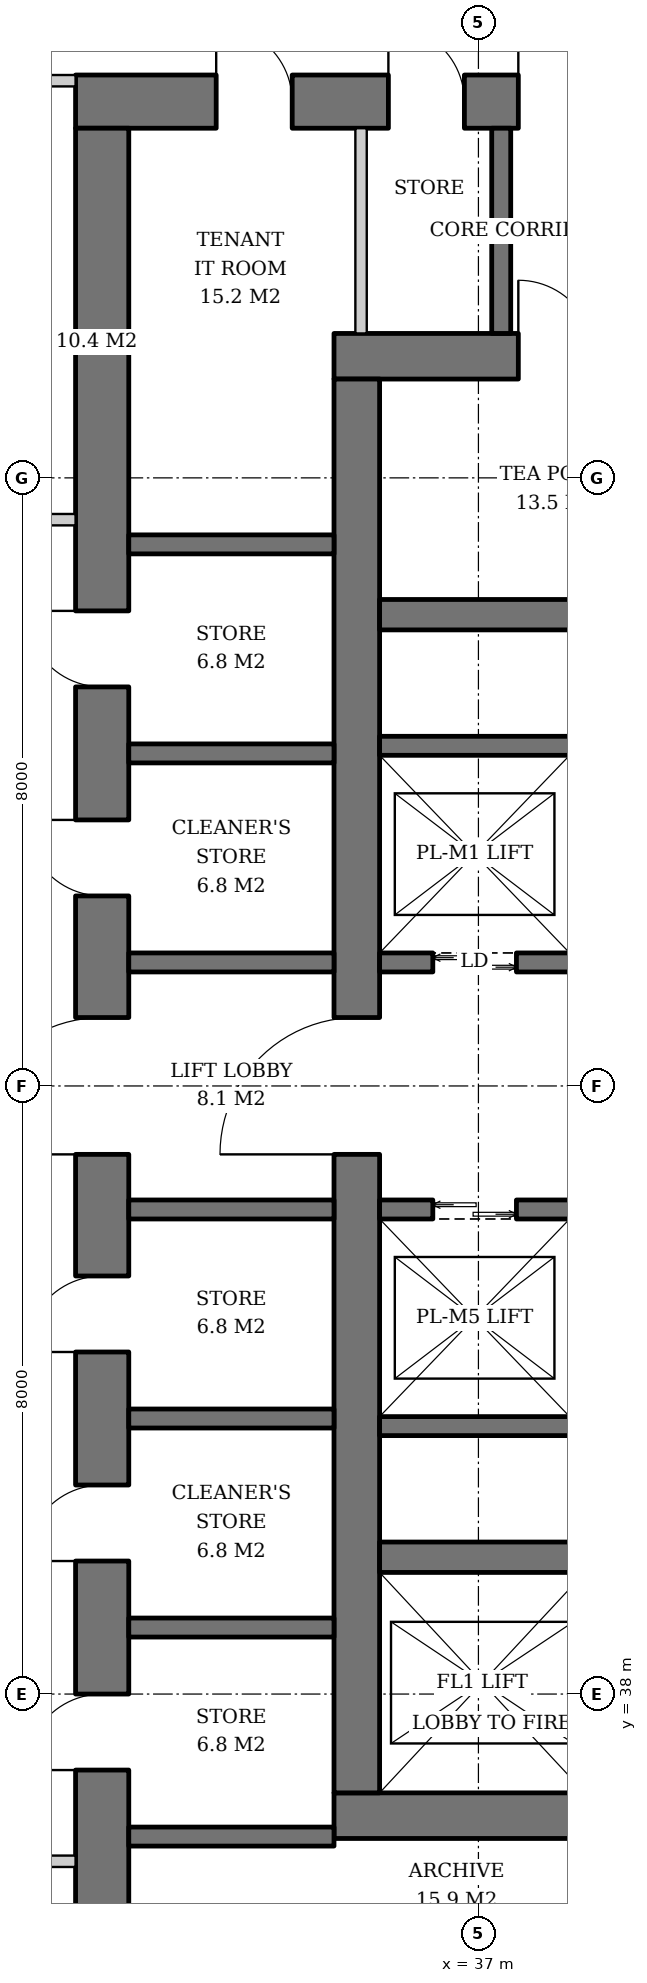
"""IFC4 building model, lengths in metres.
Left out: names, types, materials, properties, quantities, classifications, styles, units other than length and angle.
Written with IfcOpenShell. Run it as: python <this file> out.ifc"""

import sys

from ifc_helpers import new_model, si_unit, direction, frame, frame_2d, origin, place, context, subcontext, project, spatial, rectangle, extrude, element, fill, save


model = new_model("IFC4")
c1 = context("Model", 3, precision=1e-05, world=origin(), true_north=direction((0.0, 1.0)))
c2 = subcontext(c1, "Body", "Model", "MODEL_VIEW")
j1 = project(units=[si_unit("LENGTHUNIT", "METRE"), si_unit("PLANEANGLEUNIT", "RADIAN")], contexts=[c1])
p1 = place(None, origin())
s1 = spatial("IfcSite", under=j1, at=p1, CompositionType="ELEMENT")
p2 = place(p1, origin())
s2 = spatial("IfcBuilding", under=s1, at=p2, CompositionType="ELEMENT")
p3 = place(p2, frame((0.0, 0.0, 108.4)))
s3 = spatial("IfcBuildingStorey", under=s2, at=p3, CompositionType="ELEMENT", Elevation=108.4)
p4 = place(p3, frame((35.1, 36.4, 0.0), z_axis=(0.0, 0.0, 1.0), x_axis=(1.0, 0.0, 0.0)))
e1 = element("IfcWall", 1, at=p4, inside=s3, PredefinedType="SHEAR", context=c2, shape_type="SweptSolid", body=[
    extrude(rectangle(XDim=19.8, YDim=0.6, at=frame_2d((9.9, 0.0))), origin(), (0.0, 0.0, 1.0), 3.8),
])
p5 = place(p4, frame((3.9, 0.0, 0.0)))
e2 = element("IfcOpeningElement", 2, at=p5, cuts=e1, PredefinedType="OPENING", context=c2, shape_type="SweptSolid", body=[
    extrude(rectangle(XDim=1.0, YDim=2.1, at=frame_2d((0.5, 1.05))), frame((0.0, 0.31, 0.0), z_axis=(0.0, -1.0, 0.0), x_axis=(1.0, 0.0, 0.0)), (0.0, 0.0, 1.0), 0.62),
])
p6 = place(p4, frame((15.35, 0.0, 0.0)))
e3 = element("IfcOpeningElement", 3, at=p6, cuts=e1, PredefinedType="OPENING", context=c2, shape_type="SweptSolid", body=[
    extrude(rectangle(XDim=1.0, YDim=2.1, at=frame_2d((0.5, 1.05))), frame((0.0, 0.31, 0.0), z_axis=(0.0, -1.0, 0.0), x_axis=(1.0, 0.0, 0.0)), (0.0, 0.0, 1.0), 0.62),
])
p7 = place(p3, frame((35.1, 55.6, 0.0), z_axis=(0.0, 0.0, 1.0), x_axis=(1.0, 0.0, 0.0)))
e4 = element("IfcWall", 4, at=p7, inside=s3, PredefinedType="SHEAR", context=c2, shape_type="SweptSolid", body=[
    extrude(rectangle(XDim=19.8, YDim=0.6, at=frame_2d((9.9, 0.0))), origin(), (0.0, 0.0, 1.0), 3.8),
])
p8 = place(p7, frame((14.54, 0.0, 0.0)))
e5 = element("IfcOpeningElement", 5, at=p8, cuts=e4, PredefinedType="OPENING", context=c2, shape_type="SweptSolid", body=[
    extrude(rectangle(XDim=1.0, YDim=2.1, at=frame_2d((0.5, 1.05))), frame((0.0, 0.31, 0.0), z_axis=(0.0, -1.0, 0.0), x_axis=(1.0, 0.0, 0.0)), (0.0, 0.0, 1.0), 0.62),
])
p9 = place(p7, frame((2.425, 0.0, 0.0)))
e6 = element("IfcOpeningElement", 6, at=p9, cuts=e4, PredefinedType="OPENING", context=c2, shape_type="SweptSolid", body=[
    extrude(rectangle(XDim=1.0, YDim=2.1, at=frame_2d((0.5, 1.05))), frame((0.0, 0.31, 0.0), z_axis=(0.0, -1.0, 0.0), x_axis=(1.0, 0.0, 0.0)), (0.0, 0.0, 1.0), 0.62),
])
p10 = place(p3, frame((35.4, 36.7, 0.0), z_axis=(0.0, 0.0, 1.0), x_axis=(0.0, 1.0, 0.0)))
e7 = element("IfcWall", 7, at=p10, inside=s3, PredefinedType="SHEAR", context=c2, shape_type="SweptSolid", body=[
    extrude(rectangle(XDim=18.6, YDim=0.6, at=frame_2d((9.3, 0.0))), origin(), (0.0, 0.0, 1.0), 3.8),
])
p11 = place(p10, frame((8.4, 0.0, 0.0)))
e8 = element("IfcOpeningElement", 8, at=p11, cuts=e7, PredefinedType="OPENING", context=c2, shape_type="SweptSolid", body=[
    extrude(rectangle(XDim=1.8, YDim=2.4, at=frame_2d((0.9, 1.2))), frame((0.0, 0.31, 0.0), z_axis=(0.0, -1.0, 0.0), x_axis=(1.0, 0.0, 0.0)), (0.0, 0.0, 1.0), 0.62),
])
p12 = place(p3, frame((31.7, 58.95, 0.0), z_axis=(0.0, 0.0, 1.0), x_axis=(1.0, 0.0, 0.0)))
e9 = element("IfcWall", 9, at=p12, inside=s3, PredefinedType="SHEAR", context=c2, shape_type="SweptSolid", body=[
    extrude(rectangle(XDim=26.6, YDim=0.7, at=frame_2d((13.3, 0.0))), origin(), (0.0, 0.0, 1.0), 3.8),
])
p13 = place(p12, frame((17.94, 0.0, 0.0)))
e10 = element("IfcOpeningElement", 10, at=p13, cuts=e9, PredefinedType="OPENING", context=c2, shape_type="SweptSolid", body=[
    extrude(rectangle(XDim=1.0, YDim=2.1, at=frame_2d((0.5, 1.05))), frame((0.0, 0.36, 0.0), z_axis=(0.0, -1.0, 0.0), x_axis=(1.0, 0.0, 0.0)), (0.0, 0.0, 1.0), 0.72),
])
p14 = place(p12, frame((5.825, 0.0, 0.0)))
e11 = element("IfcOpeningElement", 11, at=p14, cuts=e9, PredefinedType="OPENING", context=c2, shape_type="SweptSolid", body=[
    extrude(rectangle(XDim=1.0, YDim=2.1, at=frame_2d((0.5, 1.05))), frame((0.0, 0.36, 0.0), z_axis=(0.0, -1.0, 0.0), x_axis=(1.0, 0.0, 0.0)), (0.0, 0.0, 1.0), 0.72),
])
p15 = place(p12, frame((1.85, 0.0, 0.0)))
e12 = element("IfcOpeningElement", 12, at=p15, cuts=e9, PredefinedType="OPENING", context=c2, shape_type="SweptSolid", body=[
    extrude(rectangle(XDim=1.0, YDim=2.1, at=frame_2d((0.5, 1.05))), frame((0.0, 0.36, 0.0), z_axis=(0.0, -1.0, 0.0), x_axis=(1.0, 0.0, 0.0)), (0.0, 0.0, 1.0), 0.72),
])
p16 = place(p12, frame((4.115, 0.0, 0.0)))
e13 = element("IfcOpeningElement", 13, at=p16, cuts=e9, PredefinedType="OPENING", context=c2, shape_type="SweptSolid", body=[
    extrude(rectangle(XDim=1.0, YDim=2.1, at=frame_2d((0.5, 1.05))), frame((0.0, 0.36, 0.0), z_axis=(0.0, -1.0, 0.0), x_axis=(1.0, 0.0, 0.0)), (0.0, 0.0, 1.0), 0.72),
])
p17 = place(p12, frame((11.577, 0.0, 0.0)))
e14 = element("IfcOpeningElement", 14, at=p17, cuts=e9, PredefinedType="OPENING", context=c2, shape_type="SweptSolid", body=[
    extrude(rectangle(XDim=1.0, YDim=2.1, at=frame_2d((0.5, 1.05))), frame((0.0, 0.36, 0.0), z_axis=(0.0, -1.0, 0.0), x_axis=(1.0, 0.0, 0.0)), (0.0, 0.0, 1.0), 0.72),
])
p18 = place(p12, frame((20.9, 0.0, 0.0)))
e15 = element("IfcOpeningElement", 15, at=p18, cuts=e9, PredefinedType="OPENING", context=c2, shape_type="SweptSolid", body=[
    extrude(rectangle(XDim=1.0, YDim=2.1, at=frame_2d((0.5, 1.05))), frame((0.0, 0.36, 0.0), z_axis=(0.0, -1.0, 0.0), x_axis=(1.0, 0.0, 0.0)), (0.0, 0.0, 1.0), 0.72),
])
p19 = place(p12, frame((23.75, 0.0, 0.0)))
e16 = element("IfcOpeningElement", 16, at=p19, cuts=e9, PredefinedType="OPENING", context=c2, shape_type="SweptSolid", body=[
    extrude(rectangle(XDim=1.0, YDim=2.1, at=frame_2d((0.5, 1.05))), frame((0.0, 0.36, 0.0), z_axis=(0.0, -1.0, 0.0), x_axis=(1.0, 0.0, 0.0)), (0.0, 0.0, 1.0), 0.72),
])
p20 = place(p3, frame((32.05, 33.4, 0.0), z_axis=(0.0, 0.0, 1.0), x_axis=(0.0, 1.0, 0.0)))
e17 = element("IfcWall", 17, at=p20, inside=s3, PredefinedType="SHEAR", context=c2, shape_type="SweptSolid", body=[
    extrude(rectangle(XDim=25.2, YDim=0.7, at=frame_2d((12.6, 0.0))), origin(), (0.0, 0.0, 1.0), 3.8),
])
p21 = place(p20, frame((11.7, 0.0, 0.0)))
e18 = element("IfcOpeningElement", 18, at=p21, cuts=e17, PredefinedType="OPENING", context=c2, shape_type="SweptSolid", body=[
    extrude(rectangle(XDim=1.8, YDim=2.4, at=frame_2d((0.9, 1.2))), frame((0.0, 0.36, 0.0), z_axis=(0.0, -1.0, 0.0), x_axis=(1.0, 0.0, 0.0)), (0.0, 0.0, 1.0), 0.72),
])
p22 = place(p20, frame((3.6, 0.0, 0.0)))
e19 = element("IfcOpeningElement", 19, at=p22, cuts=e17, PredefinedType="OPENING", context=c2, shape_type="SweptSolid", body=[
    extrude(rectangle(XDim=1.0, YDim=2.1, at=frame_2d((0.5, 1.05))), frame((0.0, 0.36, 0.0), z_axis=(0.0, -1.0, 0.0), x_axis=(1.0, 0.0, 0.0)), (0.0, 0.0, 1.0), 0.72),
])
p23 = place(p20, frame((6.35, 0.0, 0.0)))
e20 = element("IfcOpeningElement", 20, at=p23, cuts=e17, PredefinedType="OPENING", context=c2, shape_type="SweptSolid", body=[
    extrude(rectangle(XDim=1.0, YDim=2.1, at=frame_2d((0.5, 1.05))), frame((0.0, 0.36, 0.0), z_axis=(0.0, -1.0, 0.0), x_axis=(1.0, 0.0, 0.0)), (0.0, 0.0, 1.0), 0.72),
])
p24 = place(p20, frame((9.1, 0.0, 0.0)))
e21 = element("IfcOpeningElement", 21, at=p24, cuts=e17, PredefinedType="OPENING", context=c2, shape_type="SweptSolid", body=[
    extrude(rectangle(XDim=1.0, YDim=2.1, at=frame_2d((0.5, 1.05))), frame((0.0, 0.36, 0.0), z_axis=(0.0, -1.0, 0.0), x_axis=(1.0, 0.0, 0.0)), (0.0, 0.0, 1.0), 0.72),
])
p25 = place(p20, frame((15.1, 0.0, 0.0)))
e22 = element("IfcOpeningElement", 22, at=p25, cuts=e17, PredefinedType="OPENING", context=c2, shape_type="SweptSolid", body=[
    extrude(rectangle(XDim=1.0, YDim=2.1, at=frame_2d((0.5, 1.05))), frame((0.0, 0.36, 0.0), z_axis=(0.0, -1.0, 0.0), x_axis=(1.0, 0.0, 0.0)), (0.0, 0.0, 1.0), 0.72),
])
p26 = place(p20, frame((17.85, 0.0, 0.0)))
e23 = element("IfcOpeningElement", 23, at=p26, cuts=e17, PredefinedType="OPENING", context=c2, shape_type="SweptSolid", body=[
    extrude(rectangle(XDim=1.0, YDim=2.1, at=frame_2d((0.5, 1.05))), frame((0.0, 0.36, 0.0), z_axis=(0.0, -1.0, 0.0), x_axis=(1.0, 0.0, 0.0)), (0.0, 0.0, 1.0), 0.72),
])
for number, where, z_axis, x_axis in (
    (24, (35.7, 39.8, 0.0), (0.0, 0.0, 1.0), (1.0, 0.0, 0.0)),
    (25, (35.7, 52.2, 0.0), (0.0, 0.0, 1.0), (1.0, 0.0, 0.0)),
):
    element("IfcWall", number, at=place(p3, frame(where, z_axis=z_axis, x_axis=x_axis)), inside=s3, PredefinedType="SHEAR", context=c2, shape_type="SweptSolid", body=[
        extrude(rectangle(XDim=18.6, YDim=0.4, at=frame_2d((9.3, 0.0))), origin(), (0.0, 0.0, 1.0), 3.8),
    ])
p27 = place(p3, frame((35.7, 50.475, 0.0), z_axis=(0.0, 0.0, 1.0), x_axis=(1.0, 0.0, 0.0)))
e26 = element("IfcWall", 26, at=p27, inside=s3, PredefinedType="SHEAR", context=c2, shape_type="SweptSolid", body=[
    extrude(rectangle(XDim=11.0, YDim=0.25, at=frame_2d((5.5, 0.0))), origin(), (0.0, 0.0, 1.0), 3.8),
])
p28 = place(p3, frame((35.7, 47.625, 0.0), z_axis=(0.0, 0.0, 1.0), x_axis=(1.0, 0.0, 0.0)))
e27 = element("IfcWall", 27, at=p28, inside=s3, PredefinedType="SHEAR", context=c2, shape_type="SweptSolid", body=[
    extrude(rectangle(XDim=12.83, YDim=0.25, at=frame_2d((6.415, 0.0))), origin(), (0.0, 0.0, 1.0), 3.8),
])
p29 = place(p28, frame((0.7, 0.0, 0.0)))
e28 = element("IfcOpeningElement", 28, at=p29, cuts=e27, PredefinedType="OPENING", context=c2, shape_type="SweptSolid", body=[
    extrude(rectangle(XDim=1.1, YDim=2.2, at=frame_2d((0.55, 1.1))), frame((0.0, 0.135, 0.0), z_axis=(0.0, -1.0, 0.0), x_axis=(1.0, 0.0, 0.0)), (0.0, 0.0, 1.0), 0.27),
])
p30 = place(p28, frame((3.45, 0.0, 0.0)))
e29 = element("IfcOpeningElement", 29, at=p30, cuts=e27, PredefinedType="OPENING", context=c2, shape_type="SweptSolid", body=[
    extrude(rectangle(XDim=1.1, YDim=2.2, at=frame_2d((0.55, 1.1))), frame((0.0, 0.135, 0.0), z_axis=(0.0, -1.0, 0.0), x_axis=(1.0, 0.0, 0.0)), (0.0, 0.0, 1.0), 0.27),
])
p31 = place(p28, frame((6.2, 0.0, 0.0)))
e30 = element("IfcOpeningElement", 30, at=p31, cuts=e27, PredefinedType="OPENING", context=c2, shape_type="SweptSolid", body=[
    extrude(rectangle(XDim=1.1, YDim=2.2, at=frame_2d((0.55, 1.1))), frame((0.0, 0.135, 0.0), z_axis=(0.0, -1.0, 0.0), x_axis=(1.0, 0.0, 0.0)), (0.0, 0.0, 1.0), 0.27),
])
p32 = place(p28, frame((8.95, 0.0, 0.0)))
e31 = element("IfcOpeningElement", 31, at=p32, cuts=e27, PredefinedType="OPENING", context=c2, shape_type="SweptSolid", body=[
    extrude(rectangle(XDim=1.1, YDim=2.2, at=frame_2d((0.55, 1.1))), frame((0.0, 0.135, 0.0), z_axis=(0.0, -1.0, 0.0), x_axis=(1.0, 0.0, 0.0)), (0.0, 0.0, 1.0), 0.27),
])
p33 = place(p28, frame((11.515, 0.0, 0.0)))
e32 = element("IfcOpeningElement", 32, at=p33, cuts=e27, PredefinedType="OPENING", context=c2, shape_type="SweptSolid", body=[
    extrude(rectangle(XDim=0.8, YDim=2.0, at=frame_2d((0.4, 1.0))), frame((0.0, 0.135, 0.0), z_axis=(0.0, -1.0, 0.0), x_axis=(1.0, 0.0, 0.0)), (0.0, 0.0, 1.0), 0.27),
])
p34 = place(p3, frame((35.7, 41.525, 0.0), z_axis=(0.0, 0.0, 1.0), x_axis=(1.0, 0.0, 0.0)))
e33 = element("IfcWall", 33, at=p34, inside=s3, PredefinedType="SHEAR", context=c2, shape_type="SweptSolid", body=[
    extrude(rectangle(XDim=11.0, YDim=0.25, at=frame_2d((5.5, 0.0))), origin(), (0.0, 0.0, 1.0), 3.8),
])
p35 = place(p3, frame((35.7, 44.375, 0.0), z_axis=(0.0, 0.0, 1.0), x_axis=(1.0, 0.0, 0.0)))
e34 = element("IfcWall", 34, at=p35, inside=s3, PredefinedType="SHEAR", context=c2, shape_type="SweptSolid", body=[
    extrude(rectangle(XDim=12.83, YDim=0.25, at=frame_2d((6.415, 0.0))), origin(), (0.0, 0.0, 1.0), 3.8),
])
p36 = place(p35, frame((0.7, 0.0, 0.0)))
e35 = element("IfcOpeningElement", 35, at=p36, cuts=e34, PredefinedType="OPENING", context=c2, shape_type="SweptSolid", body=[
    extrude(rectangle(XDim=1.1, YDim=2.2, at=frame_2d((0.55, 1.1))), frame((0.0, 0.135, 0.0), z_axis=(0.0, -1.0, 0.0), x_axis=(1.0, 0.0, 0.0)), (0.0, 0.0, 1.0), 0.27),
])
p37 = place(p35, frame((3.45, 0.0, 0.0)))
e36 = element("IfcOpeningElement", 36, at=p37, cuts=e34, PredefinedType="OPENING", context=c2, shape_type="SweptSolid", body=[
    extrude(rectangle(XDim=1.1, YDim=2.2, at=frame_2d((0.55, 1.1))), frame((0.0, 0.135, 0.0), z_axis=(0.0, -1.0, 0.0), x_axis=(1.0, 0.0, 0.0)), (0.0, 0.0, 1.0), 0.27),
])
p38 = place(p35, frame((6.2, 0.0, 0.0)))
e37 = element("IfcOpeningElement", 37, at=p38, cuts=e34, PredefinedType="OPENING", context=c2, shape_type="SweptSolid", body=[
    extrude(rectangle(XDim=1.1, YDim=2.2, at=frame_2d((0.55, 1.1))), frame((0.0, 0.135, 0.0), z_axis=(0.0, -1.0, 0.0), x_axis=(1.0, 0.0, 0.0)), (0.0, 0.0, 1.0), 0.27),
])
p39 = place(p35, frame((8.95, 0.0, 0.0)))
e38 = element("IfcOpeningElement", 38, at=p39, cuts=e34, PredefinedType="OPENING", context=c2, shape_type="SweptSolid", body=[
    extrude(rectangle(XDim=1.1, YDim=2.2, at=frame_2d((0.55, 1.1))), frame((0.0, 0.135, 0.0), z_axis=(0.0, -1.0, 0.0), x_axis=(1.0, 0.0, 0.0)), (0.0, 0.0, 1.0), 0.27),
])
p40 = place(p35, frame((11.515, 0.0, 0.0)))
e39 = element("IfcOpeningElement", 39, at=p40, cuts=e34, PredefinedType="OPENING", context=c2, shape_type="SweptSolid", body=[
    extrude(rectangle(XDim=0.8, YDim=2.0, at=frame_2d((0.4, 1.0))), frame((0.0, 0.135, 0.0), z_axis=(0.0, -1.0, 0.0), x_axis=(1.0, 0.0, 0.0)), (0.0, 0.0, 1.0), 0.27),
])
for number, where, z_axis, x_axis in (
    (40, (32.4, 36.125, 0.0), (0.0, 0.0, 1.0), (1.0, 0.0, 0.0)),
    (41, (32.4, 38.875, 0.0), (0.0, 0.0, 1.0), (1.0, 0.0, 0.0)),
    (42, (32.4, 41.625, 0.0), (0.0, 0.0, 1.0), (1.0, 0.0, 0.0)),
    (43, (32.4, 44.375, 0.0), (0.0, 0.0, 1.0), (1.0, 0.0, 0.0)),
    (44, (32.4, 47.625, 0.0), (0.0, 0.0, 1.0), (1.0, 0.0, 0.0)),
    (45, (32.4, 50.375, 0.0), (0.0, 0.0, 1.0), (1.0, 0.0, 0.0)),
    (46, (32.4, 53.125, 0.0), (0.0, 0.0, 1.0), (1.0, 0.0, 0.0)),
):
    element("IfcWall", number, at=place(p3, frame(where, z_axis=z_axis, x_axis=x_axis)), inside=s3, PredefinedType="SHEAR", context=c2, shape_type="SweptSolid", body=[
        extrude(rectangle(XDim=2.7, YDim=0.25, at=frame_2d((1.35, 0.0))), origin(), (0.0, 0.0, 1.0), 3.8),
    ])
p41 = place(p3, frame((37.3, 55.9, 0.0), z_axis=(0.0, 0.0, 1.0), x_axis=(0.0, 1.0, 0.0)))
e47 = element("IfcWall", 47, at=p41, inside=s3, PredefinedType="SOLIDWALL", context=c2, shape_type="SweptSolid", body=[
    extrude(rectangle(XDim=2.7, YDim=0.25, at=frame_2d((1.35, 0.0))), origin(), (0.0, 0.0, 1.0), 3.62),
])
p42 = place(p3, frame((35.456, 55.9, 0.0), z_axis=(0.0, 0.0, 1.0), x_axis=(0.0, 1.0, 0.0)))
e48 = element("IfcWall", 48, at=p42, inside=s3, PredefinedType="SOLIDWALL", context=c2, shape_type="SweptSolid", body=[
    extrude(rectangle(XDim=2.7, YDim=0.15, at=frame_2d((1.35, 0.0))), origin(), (0.0, 0.0, 1.0), 3.62),
])
for number, where, z_axis, x_axis in (
    (49, (31.7, 59.225, 0.0), (0.0, 0.0, 1.0), (-1.0, 0.0, 0.0)),
    (50, (31.7, 53.45, 0.0), (0.0, 0.0, 1.0), (-1.0, 0.0, 0.0)),
    (51, (31.7, 35.8, 0.0), (0.0, 0.0, 1.0), (-1.0, 0.0, 0.0)),
):
    element("IfcWall", number, at=place(p3, frame(where, z_axis=z_axis, x_axis=x_axis)), inside=s3, PredefinedType="PARTITIONING", context=c2, shape_type="SweptSolid", body=[
        extrude(rectangle(XDim=1.725, YDim=0.15, at=frame_2d((0.862, 0.0))), origin(), (0.0, 0.0, 1.0), 3.62),
    ])
p43 = place(p29, origin())
e52 = element("IfcDoor", 52, at=p43, inside=s3, OperationType="DOUBLE_DOOR_SLIDING", PredefinedType="DOOR", context=c2, shape_type="SweptSolid", body=[
    extrude(rectangle(XDim=1.1, YDim=2.2, at=frame_2d((0.55, 1.1))), frame((0.0, 0.025, 0.0), z_axis=(0.0, -1.0, 0.0), x_axis=(1.0, 0.0, 0.0)), (0.0, 0.0, 1.0), 0.05),
])
fill(e28, e52)
p44 = place(p36, origin())
e53 = element("IfcDoor", 53, at=p44, inside=s3, OperationType="DOUBLE_DOOR_SLIDING", PredefinedType="DOOR", context=c2, shape_type="SweptSolid", body=[
    extrude(rectangle(XDim=1.1, YDim=2.2, at=frame_2d((0.55, 1.1))), frame((0.0, 0.025, 0.0), z_axis=(0.0, -1.0, 0.0), x_axis=(1.0, 0.0, 0.0)), (0.0, 0.0, 1.0), 0.05),
])
fill(e35, e53)
p45 = place(p11, origin())
e54 = element("IfcDoor", 54, at=p45, inside=s3, OperationType="DOUBLE_DOOR_SINGLE_SWING", PredefinedType="DOOR", context=c2, shape_type="SweptSolid", body=[
    extrude(rectangle(XDim=1.8, YDim=2.4, at=frame_2d((0.9, 1.2))), frame((0.0, 0.025, 0.0), z_axis=(0.0, -1.0, 0.0), x_axis=(1.0, 0.0, 0.0)), (0.0, 0.0, 1.0), 0.05),
])
fill(e8, e54)
p46 = place(p21, origin())
e55 = element("IfcDoor", 55, at=p46, inside=s3, OperationType="DOUBLE_DOOR_SINGLE_SWING", PredefinedType="DOOR", context=c2, shape_type="SweptSolid", body=[
    extrude(rectangle(XDim=1.8, YDim=2.4, at=frame_2d((0.9, 1.2))), frame((0.0, 0.025, 0.0), z_axis=(0.0, -1.0, 0.0), x_axis=(1.0, 0.0, 0.0)), (0.0, 0.0, 1.0), 0.05),
])
fill(e18, e55)
p47 = place(p14, origin())
e56 = element("IfcDoor", 56, at=p47, inside=s3, OperationType="SINGLE_SWING_LEFT", PredefinedType="DOOR", context=c2, shape_type="SweptSolid", body=[
    extrude(rectangle(XDim=1.0, YDim=2.1, at=frame_2d((0.5, 1.05))), frame((0.0, 0.025, 0.0), z_axis=(0.0, -1.0, 0.0), x_axis=(1.0, 0.0, 0.0)), (0.0, 0.0, 1.0), 0.05),
])
fill(e11, e56)
p48 = place(p9, origin())
e57 = element("IfcDoor", 57, at=p48, inside=s3, OperationType="SINGLE_SWING_LEFT", PredefinedType="DOOR", context=c2, shape_type="SweptSolid", body=[
    extrude(rectangle(XDim=1.0, YDim=2.1, at=frame_2d((0.5, 1.05))), frame((0.0, -0.24, 0.0), z_axis=(0.0, -1.0, 0.0), x_axis=(1.0, 0.0, 0.0)), (0.0, 0.0, 1.0), 0.05),
])
fill(e6, e57)
p49 = place(p22, origin())
e58 = element("IfcDoor", 58, at=p49, inside=s3, OperationType="SINGLE_SWING_LEFT", PredefinedType="DOOR", context=c2, shape_type="SweptSolid", body=[
    extrude(rectangle(XDim=1.0, YDim=2.1, at=frame_2d((0.5, 1.05))), frame((0.0, -0.29, 0.0), z_axis=(0.0, -1.0, 0.0), x_axis=(1.0, 0.0, 0.0)), (0.0, 0.0, 1.0), 0.05),
])
fill(e19, e58)
p50 = place(p23, origin())
e59 = element("IfcDoor", 59, at=p50, inside=s3, OperationType="SINGLE_SWING_LEFT", PredefinedType="DOOR", context=c2, shape_type="SweptSolid", body=[
    extrude(rectangle(XDim=1.0, YDim=2.1, at=frame_2d((0.5, 1.05))), frame((0.0, -0.29, 0.0), z_axis=(0.0, -1.0, 0.0), x_axis=(1.0, 0.0, 0.0)), (0.0, 0.0, 1.0), 0.05),
])
fill(e20, e59)
p51 = place(p24, origin())
e60 = element("IfcDoor", 60, at=p51, inside=s3, OperationType="SINGLE_SWING_LEFT", PredefinedType="DOOR", context=c2, shape_type="SweptSolid", body=[
    extrude(rectangle(XDim=1.0, YDim=2.1, at=frame_2d((0.5, 1.05))), frame((0.0, -0.29, 0.0), z_axis=(0.0, -1.0, 0.0), x_axis=(1.0, 0.0, 0.0)), (0.0, 0.0, 1.0), 0.05),
])
fill(e21, e60)
p52 = place(p25, origin())
e61 = element("IfcDoor", 61, at=p52, inside=s3, OperationType="SINGLE_SWING_RIGHT", PredefinedType="DOOR", context=c2, shape_type="SweptSolid", body=[
    extrude(rectangle(XDim=1.0, YDim=2.1, at=frame_2d((0.5, 1.05))), frame((0.0, -0.29, 0.0), z_axis=(0.0, -1.0, 0.0), x_axis=(1.0, 0.0, 0.0)), (0.0, 0.0, 1.0), 0.05),
])
fill(e22, e61)
p53 = place(p26, origin())
e62 = element("IfcDoor", 62, at=p53, inside=s3, OperationType="SINGLE_SWING_RIGHT", PredefinedType="DOOR", context=c2, shape_type="SweptSolid", body=[
    extrude(rectangle(XDim=1.0, YDim=2.1, at=frame_2d((0.5, 1.05))), frame((0.0, -0.29, 0.0), z_axis=(0.0, -1.0, 0.0), x_axis=(1.0, 0.0, 0.0)), (0.0, 0.0, 1.0), 0.05),
])
fill(e23, e62)
p54 = place(p15, origin())
e63 = element("IfcDoor", 63, at=p54, inside=s3, OperationType="SINGLE_SWING_LEFT", PredefinedType="DOOR", context=c2, shape_type="SweptSolid", body=[
    extrude(rectangle(XDim=1.0, YDim=2.1, at=frame_2d((0.5, 1.05))), frame((0.0, -0.29, 0.0), z_axis=(0.0, -1.0, 0.0), x_axis=(1.0, 0.0, 0.0)), (0.0, 0.0, 1.0), 0.05),
])
fill(e12, e63)
p55 = place(p16, origin())
e64 = element("IfcDoor", 64, at=p55, inside=s3, OperationType="SINGLE_SWING_LEFT", PredefinedType="DOOR", context=c2, shape_type="SweptSolid", body=[
    extrude(rectangle(XDim=1.0, YDim=2.1, at=frame_2d((0.5, 1.05))), frame((0.0, -0.29, 0.0), z_axis=(0.0, -1.0, 0.0), x_axis=(1.0, 0.0, 0.0)), (0.0, 0.0, 1.0), 0.05),
])
fill(e13, e64)
save(model, sys.argv[1])
